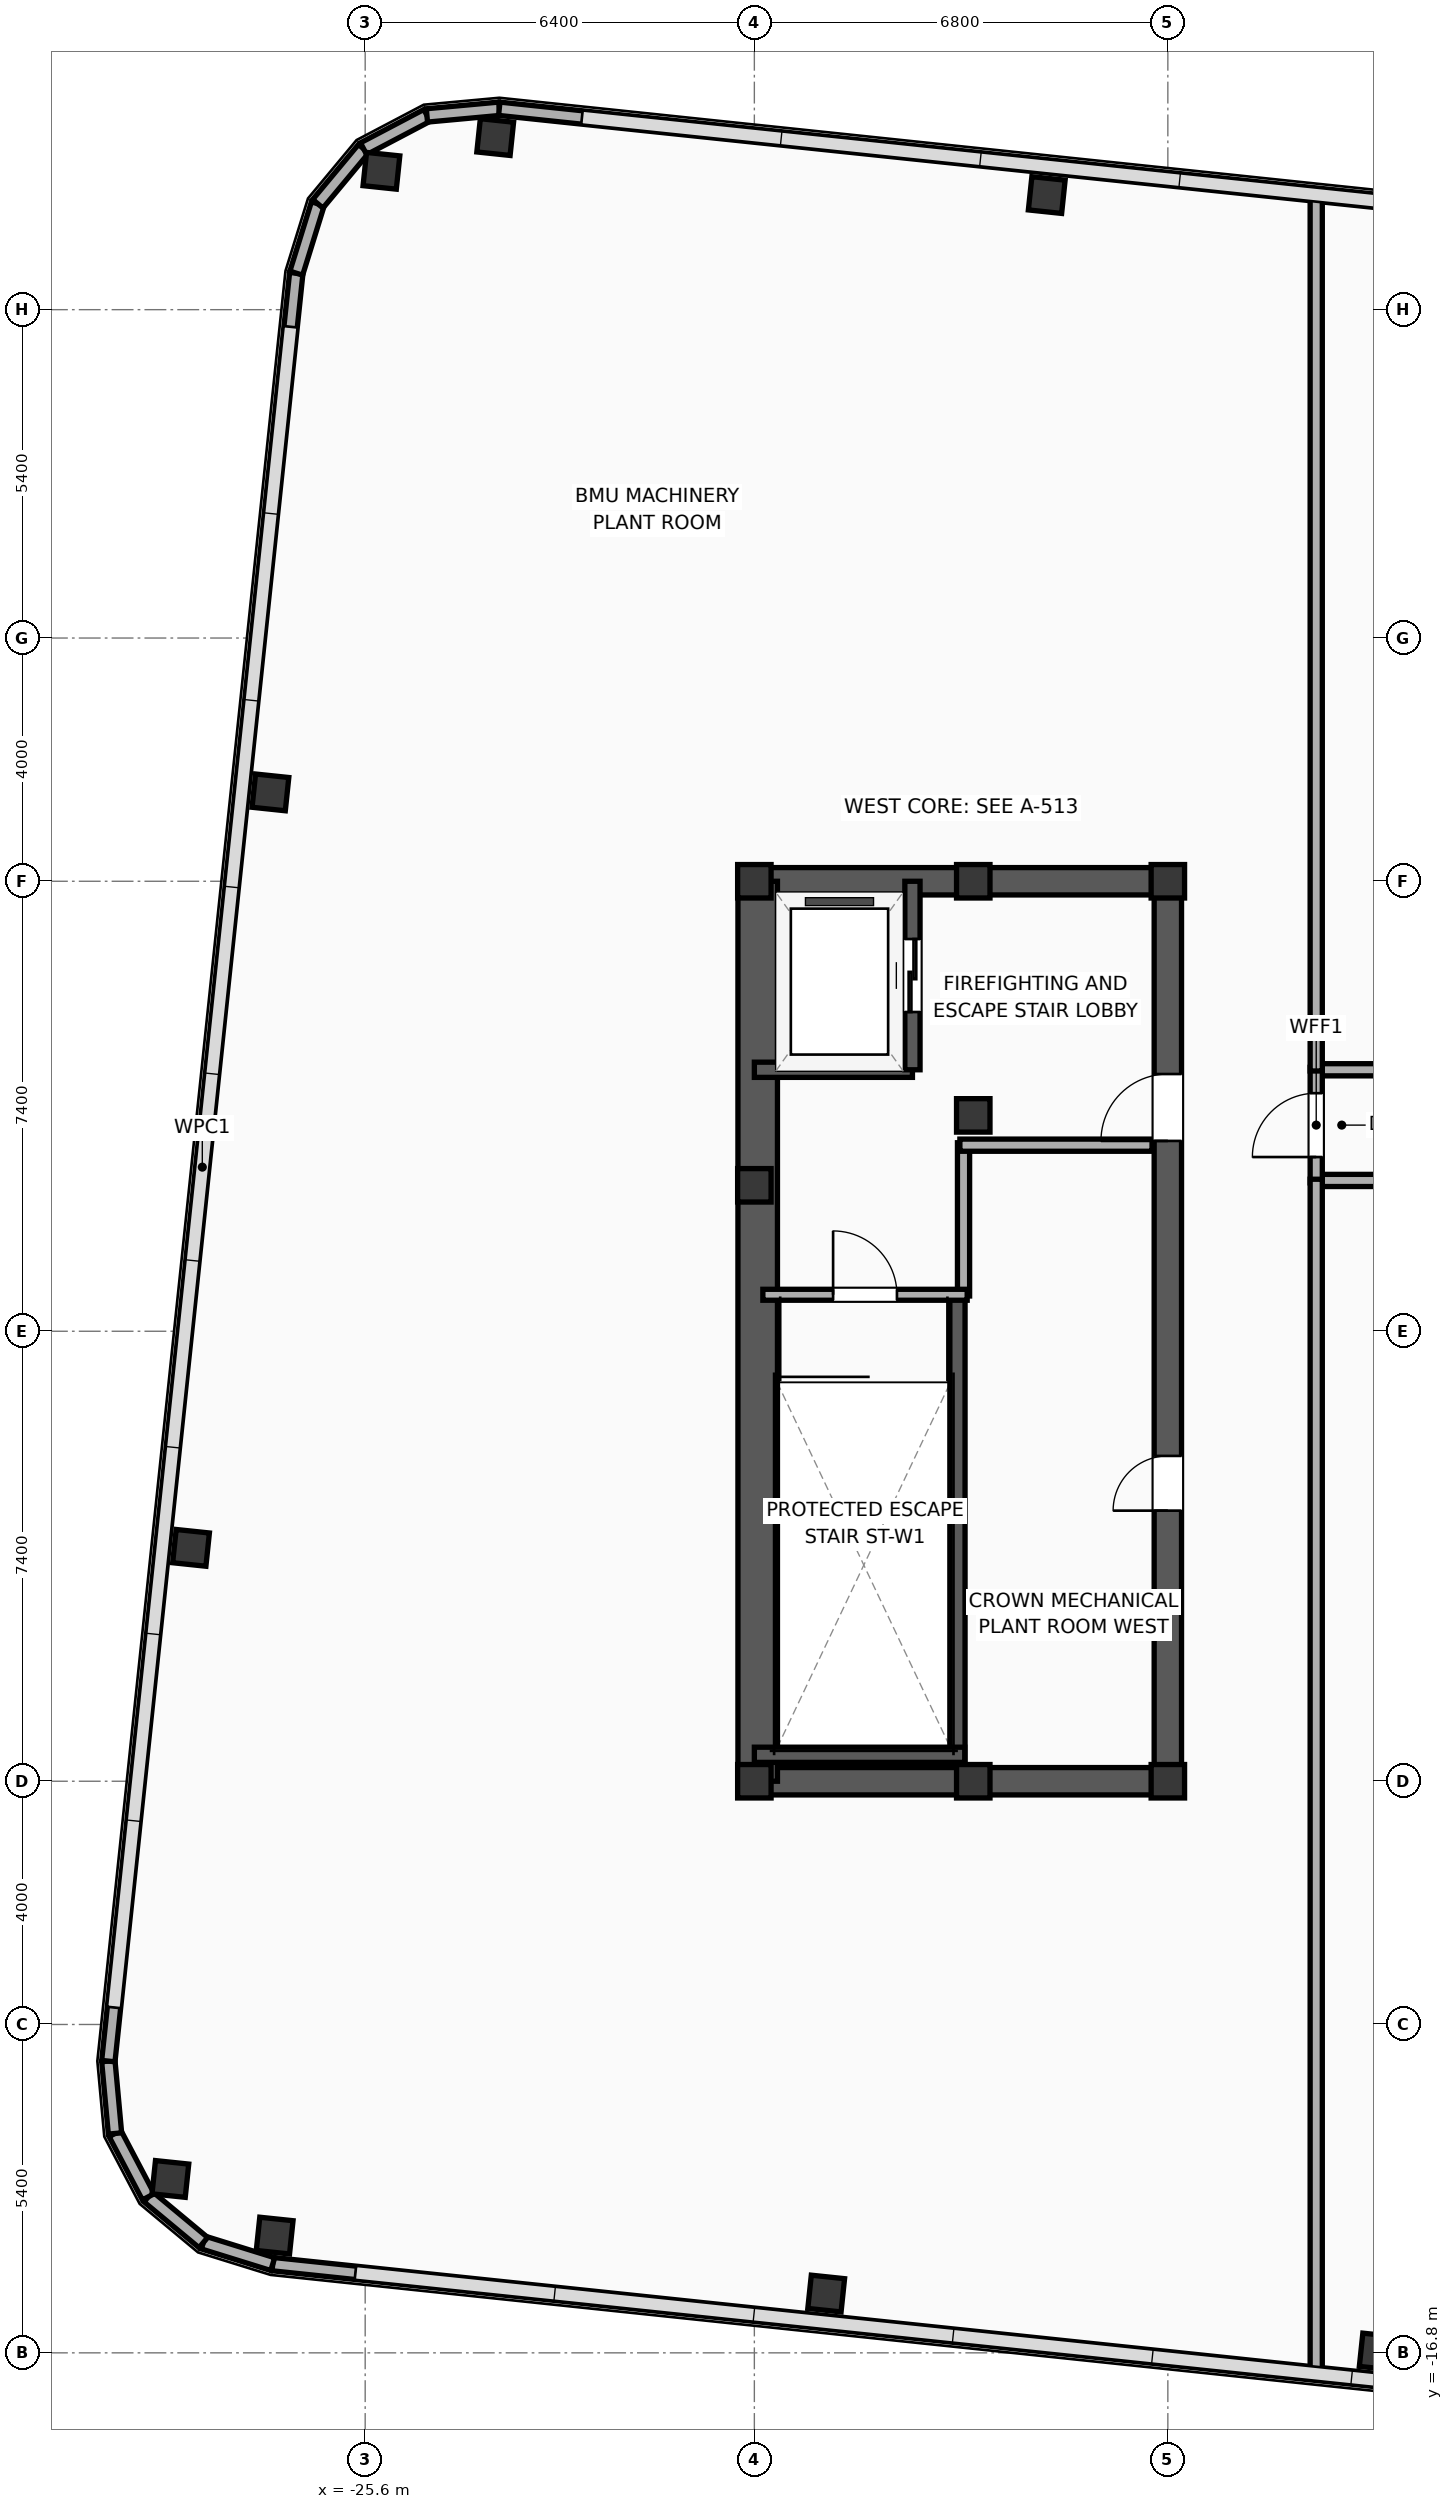
"""IFC4 building model, lengths in metres.
Left out: names, types, materials, properties, quantities, classifications, styles, units other than length and angle.
Written with IfcOpenShell. Run it as: python <this file> out.ifc"""

import sys

from ifc_helpers import new_model, si_unit, direction, frame, frame_2d, origin, origin_2d, place, context, subcontext, project, spatial, rectangle, hollow_rectangle, extrude, element, fill, save


model = new_model("IFC4")
c1 = context("Model", 3, precision=1e-05, world=origin(), true_north=direction((0.0, 1.0)))
c2 = subcontext(c1, "Body", "Model", "MODEL_VIEW")
j1 = project(units=[si_unit("LENGTHUNIT", "METRE"), si_unit("PLANEANGLEUNIT", "RADIAN")], contexts=[c1])
p1 = place(None, origin())
s1 = spatial("IfcSite", under=j1, at=p1, CompositionType="ELEMENT")
p2 = place(p1, origin())
s2 = spatial("IfcBuilding", under=s1, at=p2, CompositionType="ELEMENT")
p3 = place(p2, frame((0.0, 0.0, 337.2)))
s3 = spatial("IfcBuildingStorey", under=s2, at=p3, CompositionType="ELEMENT", Elevation=337.2)
for number, where, z_axis, x_axis in (
    (1, (-19.2, -7.4, 0.0), (0.0, 0.0, 1.0), (1.0, 0.0, 0.0)),
    (2, (-19.2, 2.4, 0.0), (0.0, 0.0, 1.0), (1.0, 0.0, 0.0)),
    (3, (-19.2, 7.4, 0.0), (0.0, 0.0, 1.0), (1.0, 0.0, 0.0)),
    (4, (-15.6, -7.4, 0.0), (0.0, 0.0, 1.0), (1.0, 0.0, 0.0)),
    (5, (-15.6, 7.4, 0.0), (0.0, 0.0, 1.0), (1.0, 0.0, 0.0)),
    (6, (-12.4, -7.4, 0.0), (0.0, 0.0, 1.0), (1.0, 0.0, 0.0)),
    (7, (-15.6, 3.55, 0.0), (0.0, 0.0, 1.0), (1.0, 0.0, 0.0)),
    (8, (-12.4, 7.4, 0.0), (0.0, 0.0, 1.0), (1.0, 0.0, 0.0)),
):
    element("IfcColumn", number, at=place(p3, frame(where, z_axis=z_axis, x_axis=x_axis)), inside=s3, PredefinedType="COLUMN", context=c2, shape_type="SweptSolid", body=[
        extrude(hollow_rectangle(XDim=0.55, YDim=0.55, WallThickness=0.022, at=origin_2d()), origin(), (0.0, 0.0, 1.0), 5.22),
    ])
for number, where, z_axis, x_axis in (
    (9, (-19.425, -7.4, 0.0), (0.0, 0.0, 1.0), (1.0, 0.0, 0.0)),
    (10, (-19.425, 7.4, 0.0), (0.0, 0.0, 1.0), (1.0, 0.0, 0.0)),
):
    element("IfcWall", number, at=place(p3, frame(where, z_axis=z_axis, x_axis=x_axis)), inside=s3, PredefinedType="SHEAR", context=c2, shape_type="SweptSolid", body=[
        extrude(rectangle(XDim=7.25, YDim=0.45, at=frame_2d((3.625, 0.0))), origin(), (0.0, 0.0, 1.0), 4.96),
    ])
p4 = place(p3, frame((-19.145, -7.4, 0.0), z_axis=(0.0, 0.0, 1.0), x_axis=(0.0, 1.0, 0.0)))
e11 = element("IfcWall", 11, at=p4, inside=s3, PredefinedType="SHEAR", context=c2, shape_type="SweptSolid", body=[
    extrude(rectangle(XDim=14.8, YDim=0.65, at=frame_2d((7.4, 0.0))), origin(), (0.0, 0.0, 1.0), 4.96),
])
p5 = place(p3, frame((-12.4, -7.4, 0.0), z_axis=(0.0, 0.0, 1.0), x_axis=(0.0, 1.0, 0.0)))
e12 = element("IfcWall", 12, at=p5, inside=s3, PredefinedType="SHEAR", context=c2, shape_type="SweptSolid", body=[
    extrude(rectangle(XDim=14.8, YDim=0.45, at=frame_2d((7.4, 0.0))), origin(), (0.0, 0.0, 1.0), 4.96),
])
p6 = place(p5, frame((10.53, 0.0, 0.0)))
e13 = element("IfcOpeningElement", 13, at=p6, cuts=e12, PredefinedType="OPENING", context=c2, shape_type="SweptSolid", body=[
    extrude(rectangle(XDim=1.1, YDim=2.05, at=frame_2d((0.55, 1.025))), frame((0.0, 0.235, 0.0), z_axis=(0.0, -1.0, 0.0), x_axis=(1.0, 0.0, 0.0)), (0.0, 0.0, 1.0), 0.47),
])
p7 = place(p5, frame((4.45, 0.0, 0.0)))
e14 = element("IfcOpeningElement", 14, at=p7, cuts=e12, PredefinedType="OPENING", context=c2, shape_type="SweptSolid", body=[
    extrude(rectangle(XDim=0.9, YDim=2.05, at=frame_2d((0.45, 1.025))), frame((0.0, 0.235, 0.0), z_axis=(0.0, -1.0, 0.0), x_axis=(1.0, 0.0, 0.0)), (0.0, 0.0, 1.0), 0.47),
])
p8 = place(p3, frame((-15.86, -7.085, 0.0), z_axis=(0.0, 0.0, 1.0), x_axis=(0.0, 1.0, 0.0)))
e15 = element("IfcWall", 15, at=p8, inside=s3, PredefinedType="SOLIDWALL", context=c2, shape_type="SweptSolid", body=[
    extrude(rectangle(XDim=7.685, YDim=0.25, at=frame_2d((3.843, 0.0))), origin(), (0.0, 0.0, 1.0), 4.96),
])
p9 = place(p3, frame((-19.2, -6.965, 0.0), z_axis=(0.0, 0.0, 1.0), x_axis=(1.0, 0.0, 0.0)))
e16 = element("IfcWall", 16, at=p9, inside=s3, PredefinedType="SOLIDWALL", context=c2, shape_type="SweptSolid", body=[
    extrude(rectangle(XDim=3.46, YDim=0.25, at=frame_2d((1.73, 0.0))), origin(), (0.0, 0.0, 1.0), 4.96),
])
for number, where, z_axis, x_axis in (
    (17, (-27.089, -14.872, 0.0), (0.0, 0.0, 1.0), (0.995, -0.105, 0.0)),
    (18, (-18.019, -15.825, 0.0), (0.0, 0.0, 1.0), (0.995, -0.105, 0.0)),
    (19, (-8.948, -16.778, 0.0), (0.0, 0.0, 1.0), (0.995, -0.105, 0.0)),
    (20, (-14.392, 18.685, 0.0), (0.0, 0.0, 1.0), (0.995, -0.105, 0.0)),
    (21, (-23.461, 19.638, 0.0), (0.0, 0.0, 1.0), (0.995, -0.105, 0.0)),
    (22, (-25.333, 19.084, 0.0), (0.0, 0.0, 1.0), (0.995, -0.105, 0.0)),
    (23, (-27.158, 8.862, 0.0), (0.0, 0.0, 1.0), (0.995, -0.105, 0.0)),
    (24, (-28.464, -3.562, 0.0), (0.0, 0.0, 1.0), (0.995, -0.105, 0.0)),
    (25, (-28.804, -13.94, 0.0), (0.0, 0.0, 1.0), (0.995, -0.105, 0.0)),
):
    element("IfcColumn", number, at=place(p3, frame(where, z_axis=z_axis, x_axis=x_axis)), inside=s3, PredefinedType="COLUMN", context=c2, shape_type="SweptSolid", body=[
        extrude(hollow_rectangle(XDim=0.55, YDim=0.55, WallThickness=0.022, at=origin_2d()), origin(), (0.0, 0.0, 1.0), 5.265),
    ])
p10 = place(p3, frame((18.195, -20.104, 0.0), z_axis=(0.0, 0.0, 1.0), x_axis=(-0.994522116558, 0.104526358762, 0.0)))
e26 = element("IfcWall", 26, at=p10, inside=s3, PredefinedType="PARAPET", context=c2, shape_type="SweptSolid", body=[
    extrude(rectangle(XDim=45.564, YDim=0.22, at=frame_2d((22.782, 0.0))), origin(), (0.0, 0.0, 1.0), 1.2),
])
p11 = place(p3, frame((-27.12, -15.341, 0.0), z_axis=(0.0, 0.0, 1.0), x_axis=(-0.95499831015, 0.296611239858, 0.0)))
e27 = element("IfcWall", 27, at=p11, inside=s3, PredefinedType="PARAPET", context=c2, shape_type="SweptSolid", body=[
    extrude(rectangle(XDim=1.195, YDim=0.22, at=frame_2d((0.598, 0.0))), origin(), (0.0, 0.0, 1.0), 1.2),
])
p12 = place(p3, frame((-28.261, -14.987, 0.0), z_axis=(0.0, 0.0, 1.0), x_axis=(-0.768849923601, 0.639429272852, 0.0)))
e28 = element("IfcWall", 28, at=p12, inside=s3, PredefinedType="PARAPET", context=c2, shape_type="SweptSolid", body=[
    extrude(rectangle(XDim=1.177, YDim=0.22, at=frame_2d((0.588, 0.0))), origin(), (0.0, 0.0, 1.0), 1.2),
])
p13 = place(p3, frame((-29.167, -14.234, 0.0), z_axis=(0.0, 0.0, 1.0), x_axis=(-0.46554120999, 0.885026204019, 0.0)))
e29 = element("IfcWall", 29, at=p13, inside=s3, PredefinedType="PARAPET", context=c2, shape_type="SweptSolid", body=[
    extrude(rectangle(XDim=1.177, YDim=0.22, at=frame_2d((0.588, 0.0))), origin(), (0.0, 0.0, 1.0), 1.2),
])
p14 = place(p3, frame((-29.714, -13.192, 0.0), z_axis=(0.0, 0.0, 1.0), x_axis=(-0.091530451467, 0.995802277791, 0.0)))
e30 = element("IfcWall", 30, at=p14, inside=s3, PredefinedType="PARAPET", context=c2, shape_type="SweptSolid", body=[
    extrude(rectangle(XDim=1.195, YDim=0.22, at=frame_2d((0.598, 0.0))), origin(), (0.0, 0.0, 1.0), 1.2),
])
p15 = place(p3, frame((-29.824, -12.002, 0.0), z_axis=(0.0, 0.0, 1.0), x_axis=(0.104528313262, 0.994521911134, 0.0)))
e31 = element("IfcWall", 31, at=p15, inside=s3, PredefinedType="PARAPET", context=c2, shape_type="SweptSolid", body=[
    extrude(rectangle(XDim=29.564, YDim=0.22, at=frame_2d((14.782, 0.0))), origin(), (0.0, 0.0, 1.0), 1.2),
])
p16 = place(p3, frame((-26.733, 17.4, 0.0), z_axis=(0.0, 0.0, 1.0), x_axis=(0.296611239858, 0.95499831015, 0.0)))
e32 = element("IfcWall", 32, at=p16, inside=s3, PredefinedType="PARAPET", context=c2, shape_type="SweptSolid", body=[
    extrude(rectangle(XDim=1.195, YDim=0.22, at=frame_2d((0.598, 0.0))), origin(), (0.0, 0.0, 1.0), 1.2),
])
p17 = place(p3, frame((-26.379, 18.542, 0.0), z_axis=(0.0, 0.0, 1.0), x_axis=(0.639408628756, 0.768867092203, 0.0)))
e33 = element("IfcWall", 33, at=p17, inside=s3, PredefinedType="PARAPET", context=c2, shape_type="SweptSolid", body=[
    extrude(rectangle(XDim=1.177, YDim=0.22, at=frame_2d((0.588, 0.0))), origin(), (0.0, 0.0, 1.0), 1.2),
])
p18 = place(p3, frame((-25.626, 19.446, 0.0), z_axis=(0.0, 0.0, 1.0), x_axis=(0.884985697578, 0.465618207421, 0.0)))
e34 = element("IfcWall", 34, at=p18, inside=s3, PredefinedType="PARAPET", context=c2, shape_type="SweptSolid", body=[
    extrude(rectangle(XDim=1.177, YDim=0.22, at=frame_2d((0.589, 0.0))), origin(), (0.0, 0.0, 1.0), 1.2),
])
p19 = place(p3, frame((-24.585, 19.994, 0.0), z_axis=(0.0, 0.0, 1.0), x_axis=(0.995802277791, 0.091530451467, 0.0)))
e35 = element("IfcWall", 35, at=p19, inside=s3, PredefinedType="PARAPET", context=c2, shape_type="SweptSolid", body=[
    extrude(rectangle(XDim=1.195, YDim=0.22, at=frame_2d((0.598, 0.0))), origin(), (0.0, 0.0, 1.0), 1.2),
])
p20 = place(p3, frame((-23.395, 20.104, 0.0), z_axis=(0.0, 0.0, 1.0), x_axis=(0.994522116558, -0.104526358762, 0.0)))
e36 = element("IfcWall", 36, at=p20, inside=s3, PredefinedType="PARAPET", context=c2, shape_type="SweptSolid", body=[
    extrude(rectangle(XDim=45.564, YDim=0.22, at=frame_2d((22.782, 0.0))), origin(), (0.0, 0.0, 1.0), 1.2),
])
p21 = place(p3, frame((-19.2, 4.3, 0.0), z_axis=(0.0, 0.0, 1.0), x_axis=(1.0, 0.0, 0.0)))
e37 = element("IfcWall", 37, at=p21, inside=s3, PredefinedType="SOLIDWALL", context=c2, shape_type="SweptSolid", body=[
    extrude(rectangle(XDim=2.6, YDim=0.25, at=frame_2d((1.3, 0.0))), origin(), (0.0, 0.0, 1.0), 4.96),
])
p22 = place(p3, frame((-16.6, 4.3, 0.0), z_axis=(0.0, 0.0, 1.0), x_axis=(0.0, 1.0, 0.0)))
e38 = element("IfcWall", 38, at=p22, inside=s3, PredefinedType="SOLIDWALL", context=c2, shape_type="SweptSolid", body=[
    extrude(rectangle(XDim=3.1, YDim=0.25, at=frame_2d((1.55, 0.0))), origin(), (0.0, 0.0, 1.0), 4.96),
])
p23 = place(p22, frame((0.95, 0.0, 0.0)))
e39 = element("IfcOpeningElement", 39, at=p23, cuts=e38, PredefinedType="OPENING", context=c2, shape_type="SweptSolid", body=[
    extrude(rectangle(XDim=1.2, YDim=2.05, at=frame_2d((0.6, 1.025))), frame((0.0, 0.135, 0.0), z_axis=(0.0, -1.0, 0.0), x_axis=(1.0, 0.0, 0.0)), (0.0, 0.0, 1.0), 0.27),
])
p24 = place(p3, frame((-15.76, 0.58, 0.0), z_axis=(0.0, 0.0, 1.0), x_axis=(0.0, 1.0, 0.0)))
e40 = element("IfcWall", 40, at=p24, inside=s3, PredefinedType="PARTITIONING", context=c2, shape_type="SweptSolid", body=[
    extrude(rectangle(XDim=2.52, YDim=0.2, at=frame_2d((1.26, 0.0))), origin(), (0.0, 0.0, 1.0), 4.96),
])
p25 = place(p3, frame((-15.82, 3.06, 0.0), z_axis=(0.0, 0.0, 1.0), x_axis=(1.0, 0.0, 0.0)))
e41 = element("IfcWall", 41, at=p25, inside=s3, PredefinedType="PARTITIONING", context=c2, shape_type="SweptSolid", body=[
    extrude(rectangle(XDim=3.16, YDim=0.2, at=frame_2d((1.58, 0.0))), origin(), (0.0, 0.0, 1.0), 4.96),
])
p26 = place(p3, frame((-19.06, 0.6, 0.0), z_axis=(0.0, 0.0, 1.0), x_axis=(1.0, 0.0, 0.0)))
e42 = element("IfcWall", 42, at=p26, inside=s3, PredefinedType="PARTITIONING", context=c2, shape_type="SweptSolid", body=[
    extrude(rectangle(XDim=3.36, YDim=0.18, at=frame_2d((1.68, 0.0))), origin(), (0.0, 0.0, 1.0), 4.96),
])
p27 = place(p26, frame((1.155, 0.0, 0.0)))
e43 = element("IfcOpeningElement", 43, at=p27, cuts=e42, PredefinedType="OPENING", context=c2, shape_type="SweptSolid", body=[
    extrude(rectangle(XDim=1.05, YDim=2.05, at=frame_2d((0.525, 1.025))), frame((0.0, 0.1, 0.0), z_axis=(0.0, -1.0, 0.0), x_axis=(1.0, 0.0, 0.0)), (0.0, 0.0, 1.0), 0.2),
])
p28 = place(p3, frame((-9.98, 2.48, 0.0), z_axis=(0.0, 0.0, 1.0), x_axis=(1.0, 0.0, 0.0)))
e44 = element("IfcWall", 44, at=p28, inside=s3, PredefinedType="PARTITIONING", context=c2, shape_type="SweptSolid", body=[
    extrude(rectangle(XDim=19.96, YDim=0.2, at=frame_2d((9.98, 0.0))), origin(), (0.0, 0.0, 1.0), 4.53),
])
p29 = place(p28, frame((9.28, 0.0, 0.0)))
e45 = element("IfcOpeningElement", 45, at=p29, cuts=e44, PredefinedType="OPENING", context=c2, shape_type="SweptSolid", body=[
    extrude(rectangle(XDim=1.4, YDim=2.05, at=frame_2d((0.7, 1.025))), frame((0.0, 0.11, 0.0), z_axis=(0.0, -1.0, 0.0), x_axis=(1.0, 0.0, 0.0)), (0.0, 0.0, 1.0), 0.22),
])
p30 = place(p3, frame((-9.98, 4.3, 0.0), z_axis=(0.0, 0.0, 1.0), x_axis=(1.0, 0.0, 0.0)))
e46 = element("IfcWall", 46, at=p30, inside=s3, PredefinedType="PARTITIONING", context=c2, shape_type="SweptSolid", body=[
    extrude(rectangle(XDim=19.96, YDim=0.2, at=frame_2d((9.98, 0.0))), origin(), (0.0, 0.0, 1.0), 4.96),
])
p31 = place(p30, frame((9.28, 0.0, 0.0)))
e47 = element("IfcOpeningElement", 47, at=p31, cuts=e46, PredefinedType="OPENING", context=c2, shape_type="SweptSolid", body=[
    extrude(rectangle(XDim=1.4, YDim=2.05, at=frame_2d((0.7, 1.025))), frame((0.0, 0.11, 0.0), z_axis=(0.0, -1.0, 0.0), x_axis=(1.0, 0.0, 0.0)), (0.0, 0.0, 1.0), 0.22),
])
p32 = place(p3, frame((-9.96, 2.44, 0.0), z_axis=(0.0, 0.0, 1.0), x_axis=(0.0, 1.0, 0.0)))
e48 = element("IfcWall", 48, at=p32, inside=s3, PredefinedType="PARTITIONING", context=c2, shape_type="SweptSolid", body=[
    extrude(rectangle(XDim=1.9, YDim=0.2, at=frame_2d((0.95, 0.0))), origin(), (0.0, 0.0, 1.0), 4.96),
])
p33 = place(p32, frame((0.425, 0.0, 0.0)))
e49 = element("IfcOpeningElement", 49, at=p33, cuts=e48, PredefinedType="OPENING", context=c2, shape_type="SweptSolid", body=[
    extrude(rectangle(XDim=1.05, YDim=2.05, at=frame_2d((0.525, 1.025))), frame((0.0, 0.11, 0.0), z_axis=(0.0, -1.0, 0.0), x_axis=(1.0, 0.0, 0.0)), (0.0, 0.0, 1.0), 0.22),
])
p34 = place(p3, frame((-9.96, -17.125, 0.0), z_axis=(0.0, 0.0, 1.0), x_axis=(0.0, 1.0, 0.0)))
e50 = element("IfcWall", 50, at=p34, inside=s3, PredefinedType="PARTITIONING", context=c2, shape_type="SweptSolid", body=[
    extrude(rectangle(XDim=19.625, YDim=0.2, at=frame_2d((9.812, 0.0))), origin(), (0.0, 0.0, 1.0), 4.4),
])
p35 = place(p3, frame((-9.96, 4.28, 0.0), z_axis=(0.0, 0.0, 1.0), x_axis=(0.0, 1.0, 0.0)))
e51 = element("IfcWall", 51, at=p35, inside=s3, PredefinedType="PARTITIONING", context=c2, shape_type="SweptSolid", body=[
    extrude(rectangle(XDim=14.392, YDim=0.2, at=frame_2d((7.196, 0.0))), origin(), (0.0, 0.0, 1.0), 4.96),
])
p36 = place(p23, origin())
e52 = element("IfcDoor", 52, at=p36, inside=s3, OperationType="SLIDING_TO_LEFT", PredefinedType="DOOR", context=c2, shape_type="SweptSolid", body=[
    extrude(rectangle(XDim=1.2, YDim=2.05, at=frame_2d((0.6, 1.025))), frame((0.0, 0.025, 0.0), z_axis=(0.0, -1.0, 0.0), x_axis=(1.0, 0.0, 0.0)), (0.0, 0.0, 1.0), 0.05),
])
fill(e39, e52)
p37 = place(p27, origin())
e53 = element("IfcDoor", 53, at=p37, inside=s3, OperationType="SINGLE_SWING_LEFT", PredefinedType="DOOR", context=c2, shape_type="SweptSolid", body=[
    extrude(rectangle(XDim=1.05, YDim=2.05, at=frame_2d((0.525, 1.025))), frame((0.0, 0.025, 0.0), z_axis=(0.0, -1.0, 0.0), x_axis=(1.0, 0.0, 0.0)), (0.0, 0.0, 1.0), 0.05),
])
fill(e43, e53)
p38 = place(p33, origin())
e54 = element("IfcDoor", 54, at=p38, inside=s3, OperationType="SINGLE_SWING_LEFT", PredefinedType="DOOR", context=c2, shape_type="SweptSolid", body=[
    extrude(rectangle(XDim=1.05, YDim=2.05, at=frame_2d((0.525, 1.025))), frame((0.0, 0.025, 0.0), z_axis=(0.0, -1.0, 0.0), x_axis=(1.0, 0.0, 0.0)), (0.0, 0.0, 1.0), 0.05),
])
fill(e49, e54)
p39 = place(p6, origin())
e55 = element("IfcDoor", 55, at=p39, inside=s3, OperationType="SINGLE_SWING_LEFT", PredefinedType="DOOR", context=c2, shape_type="SweptSolid", body=[
    extrude(rectangle(XDim=1.1, YDim=2.05, at=frame_2d((0.55, 1.025))), frame((0.0, 0.025, 0.0), z_axis=(0.0, -1.0, 0.0), x_axis=(1.0, 0.0, 0.0)), (0.0, 0.0, 1.0), 0.05),
])
fill(e13, e55)
p40 = place(p7, origin())
e56 = element("IfcDoor", 56, at=p40, inside=s3, OperationType="SINGLE_SWING_LEFT", PredefinedType="DOOR", context=c2, shape_type="SweptSolid", body=[
    extrude(rectangle(XDim=0.9, YDim=2.05, at=frame_2d((0.45, 1.025))), frame((0.0, 0.025, 0.0), z_axis=(0.0, -1.0, 0.0), x_axis=(1.0, 0.0, 0.0)), (0.0, 0.0, 1.0), 0.05),
])
fill(e14, e56)
save(model, sys.argv[1])
